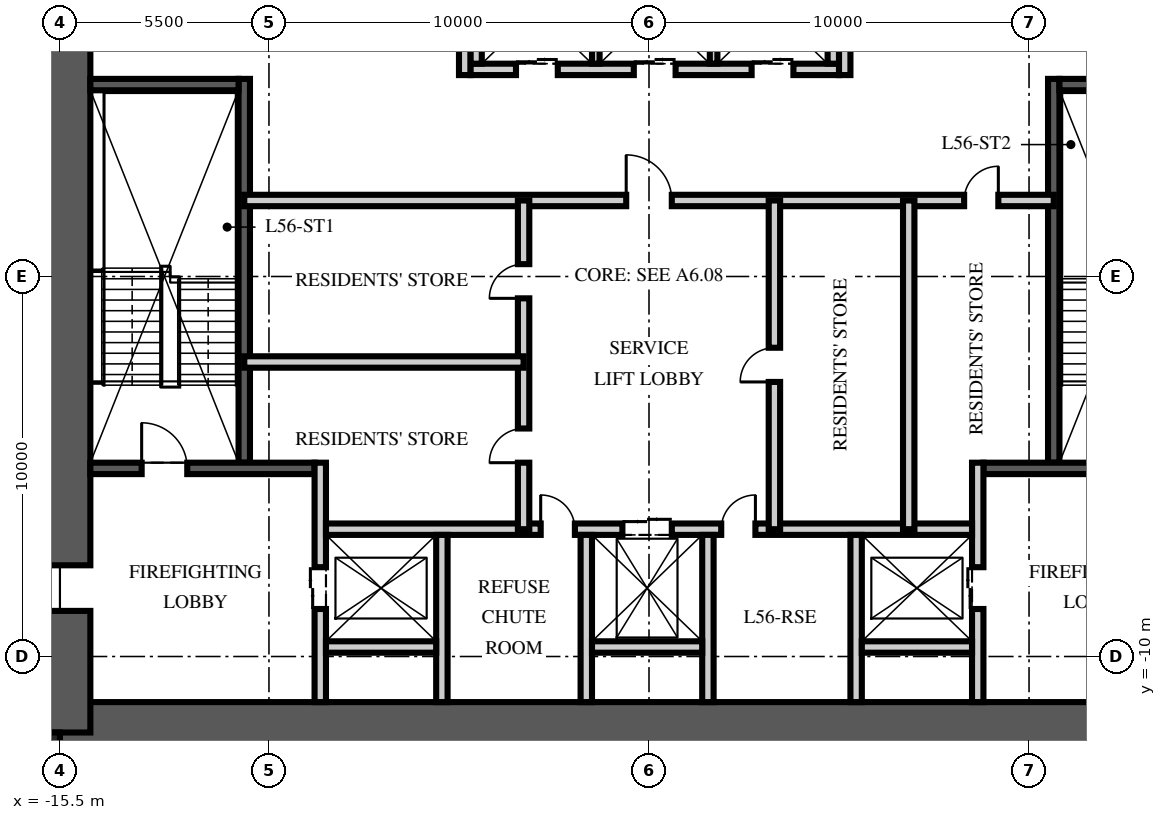
"""IFC4 building model, lengths in metres.
Left out: names, types, materials, properties, quantities, classifications, styles, units other than length and angle.
Written with IfcOpenShell. Run it as: python <this file> out.ifc"""

import sys

from ifc_helpers import new_model, si_unit, direction, frame, frame_2d, origin, origin_2d, place, context, subcontext, project, spatial, rectangle, extrude, element, fill, save


model = new_model("IFC4")
c1 = context("Model", 3, precision=1e-05, world=origin(), true_north=direction((0.0, 1.0)))
c2 = subcontext(c1, "Body", "Model", "MODEL_VIEW")
j1 = project(units=[si_unit("LENGTHUNIT", "METRE"), si_unit("PLANEANGLEUNIT", "RADIAN")], contexts=[c1])
p1 = place(None, origin())
s1 = spatial("IfcSite", under=j1, at=p1, CompositionType="ELEMENT")
p2 = place(p1, origin())
s2 = spatial("IfcBuilding", under=s1, at=p2, CompositionType="ELEMENT")
p3 = place(p2, frame((0.0, 0.0, 225.75)))
s3 = spatial("IfcBuildingStorey", under=s2, at=p3, CompositionType="ELEMENT", Elevation=225.75)
p4 = place(p3, frame((-15.5, -12.0, -0.25), z_axis=(0.0, 0.0, 1.0), x_axis=(1.0, 0.0, 0.0)))
e1 = element("IfcWall", 1, at=p4, inside=s3, PredefinedType="SHEAR", context=c2, shape_type="SweptSolid", body=[
    extrude(rectangle(XDim=31.0, YDim=1.6, at=frame_2d((15.5, 0.0))), origin(), (0.0, 0.0, 1.0), 3.75),
])
p5 = place(p3, frame((-15.5, -12.0, -0.25), z_axis=(0.0, 0.0, 1.0), x_axis=(0.0, 1.0, 0.0)))
e2 = element("IfcWall", 2, at=p5, inside=s3, PredefinedType="SHEAR", context=c2, shape_type="SweptSolid", body=[
    extrude(rectangle(XDim=24.0, YDim=1.6, at=frame_2d((12.0, 0.0))), origin(), (0.0, 0.0, 1.0), 3.75),
])
p6 = place(p5, frame((3.2, 0.0, 0.25)))
e3 = element("IfcOpeningElement", 3, at=p6, cuts=e2, PredefinedType="OPENING", context=c2, shape_type="SweptSolid", body=[
    extrude(rectangle(XDim=1.2, YDim=2.1, at=frame_2d((0.6, 1.05))), frame((0.0, 0.81, 0.0), z_axis=(0.0, -1.0, 0.0), x_axis=(1.0, 0.0, 0.0)), (0.0, 0.0, 1.0), 1.62),
])
p7 = place(p5, frame((19.3, 0.0, 0.25)))
e4 = element("IfcOpeningElement", 4, at=p7, cuts=e2, PredefinedType="OPENING", context=c2, shape_type="SweptSolid", body=[
    extrude(rectangle(XDim=1.8, YDim=2.1, at=frame_2d((0.9, 1.05))), frame((0.0, 0.81, 0.0), z_axis=(0.0, -1.0, 0.0), x_axis=(1.0, 0.0, 0.0)), (0.0, 0.0, 1.0), 1.62),
])
p8 = place(p3, frame((-15.9, -12.4, -0.25), z_axis=(0.0, 0.0, 1.0), x_axis=(1.0, 0.0, 0.0)))
e5 = element("IfcColumn", 5, at=p8, inside=s3, PredefinedType="COLUMN", context=c2, shape_type="SweptSolid", body=[
    extrude(rectangle(XDim=0.8, YDim=0.8, at=origin_2d()), origin(), (0.0, 0.0, 1.0), 3.75),
])
p9 = place(p3, frame((-10.65, -4.9, 0.0), z_axis=(0.0, 0.0, 1.0), x_axis=(0.0, 1.0, 0.0)))
e6 = element("IfcWall", 6, at=p9, inside=s3, PredefinedType="SOLIDWALL", context=c2, shape_type="SweptSolid", body=[
    extrude(rectangle(XDim=10.1, YDim=0.3, at=frame_2d((5.05, 0.0))), origin(), (0.0, 0.0, 1.0), 3.5),
])
p10 = place(p3, frame((-14.7, -5.05, 0.0), z_axis=(0.0, 0.0, 1.0), x_axis=(1.0, 0.0, 0.0)))
e7 = element("IfcWall", 7, at=p10, inside=s3, PredefinedType="SOLIDWALL", context=c2, shape_type="SweptSolid", body=[
    extrude(rectangle(XDim=5.9, YDim=0.3, at=frame_2d((2.95, 0.0))), origin(), (0.0, 0.0, 1.0), 3.5),
])
p11 = place(p10, frame((1.35, 0.0, 0.0)))
e8 = element("IfcOpeningElement", 8, at=p11, cuts=e7, PredefinedType="OPENING", context=c2, shape_type="SweptSolid", body=[
    extrude(rectangle(XDim=1.2, YDim=2.1, at=frame_2d((0.6, 1.05))), frame((0.0, 0.16, 0.0), z_axis=(0.0, -1.0, 0.0), x_axis=(1.0, 0.0, 0.0)), (0.0, 0.0, 1.0), 0.32),
])
p12 = place(p3, frame((-14.7, 5.05, 0.0), z_axis=(0.0, 0.0, 1.0), x_axis=(1.0, 0.0, 0.0)))
e9 = element("IfcWall", 9, at=p12, inside=s3, PredefinedType="SOLIDWALL", context=c2, shape_type="SweptSolid", body=[
    extrude(rectangle(XDim=3.9, YDim=0.3, at=frame_2d((1.95, 0.0))), origin(), (0.0, 0.0, 1.0), 3.5),
])
p13 = place(p3, frame((-8.65, -11.2, 0.0), z_axis=(0.0, 0.0, 1.0), x_axis=(0.0, 1.0, 0.0)))
e10 = element("IfcWall", 10, at=p13, inside=s3, PredefinedType="PARTITIONING", context=c2, shape_type="SweptSolid", body=[
    extrude(rectangle(XDim=6.3, YDim=0.3, at=frame_2d((3.15, 0.0))), origin(), (0.0, 0.0, 1.0), 3.5),
])
p14 = place(p13, frame((2.45, 0.0, 0.0)))
e11 = element("IfcOpeningElement", 11, at=p14, cuts=e10, PredefinedType="OPENING", context=c2, shape_type="SweptSolid", body=[
    extrude(rectangle(XDim=1.1, YDim=2.1, at=frame_2d((0.55, 1.05))), frame((0.0, 0.16, 0.0), z_axis=(0.0, -1.0, 0.0), x_axis=(1.0, 0.0, 0.0)), (0.0, 0.0, 1.0), 0.32),
])
p15 = place(p3, frame((10.65, -4.9, 0.0), z_axis=(0.0, 0.0, 1.0), x_axis=(0.0, 1.0, 0.0)))
e12 = element("IfcWall", 12, at=p15, inside=s3, PredefinedType="SOLIDWALL", context=c2, shape_type="SweptSolid", body=[
    extrude(rectangle(XDim=10.1, YDim=0.3, at=frame_2d((5.05, 0.0))), origin(), (0.0, 0.0, 1.0), 3.5),
])
p16 = place(p3, frame((14.7, -5.05, 0.0), z_axis=(0.0, 0.0, 1.0), x_axis=(-1.0, 0.0, 0.0)))
e13 = element("IfcWall", 13, at=p16, inside=s3, PredefinedType="SOLIDWALL", context=c2, shape_type="SweptSolid", body=[
    extrude(rectangle(XDim=5.9, YDim=0.3, at=frame_2d((2.95, 0.0))), origin(), (0.0, 0.0, 1.0), 3.5),
])
p17 = place(p16, frame((1.35, 0.0, 0.0)))
e14 = element("IfcOpeningElement", 14, at=p17, cuts=e13, PredefinedType="OPENING", context=c2, shape_type="SweptSolid", body=[
    extrude(rectangle(XDim=1.2, YDim=2.1, at=frame_2d((0.6, 1.05))), frame((0.0, 0.16, 0.0), z_axis=(0.0, -1.0, 0.0), x_axis=(1.0, 0.0, 0.0)), (0.0, 0.0, 1.0), 0.32),
])
p18 = place(p3, frame((14.7, 5.05, 0.0), z_axis=(0.0, 0.0, 1.0), x_axis=(-1.0, 0.0, 0.0)))
e15 = element("IfcWall", 15, at=p18, inside=s3, PredefinedType="SOLIDWALL", context=c2, shape_type="SweptSolid", body=[
    extrude(rectangle(XDim=3.9, YDim=0.3, at=frame_2d((1.95, 0.0))), origin(), (0.0, 0.0, 1.0), 3.5),
])
p19 = place(p3, frame((8.65, -11.2, 0.0), z_axis=(0.0, 0.0, 1.0), x_axis=(0.0, 1.0, 0.0)))
e16 = element("IfcWall", 16, at=p19, inside=s3, PredefinedType="PARTITIONING", context=c2, shape_type="SweptSolid", body=[
    extrude(rectangle(XDim=6.3, YDim=0.3, at=frame_2d((3.15, 0.0))), origin(), (0.0, 0.0, 1.0), 3.5),
])
p20 = place(p19, frame((2.45, 0.0, 0.0)))
e17 = element("IfcOpeningElement", 17, at=p20, cuts=e16, PredefinedType="OPENING", context=c2, shape_type="SweptSolid", body=[
    extrude(rectangle(XDim=1.1, YDim=2.1, at=frame_2d((0.55, 1.05))), frame((0.0, 0.16, 0.0), z_axis=(0.0, -1.0, 0.0), x_axis=(1.0, 0.0, 0.0)), (0.0, 0.0, 1.0), 0.32),
])
p21 = place(p3, frame((-8.5, -6.65, 0.0), z_axis=(0.0, 0.0, 1.0), x_axis=(1.0, 0.0, 0.0)))
e18 = element("IfcWall", 18, at=p21, inside=s3, PredefinedType="PARTITIONING", context=c2, shape_type="SweptSolid", body=[
    extrude(rectangle(XDim=17.0, YDim=0.3, at=frame_2d((8.5, 0.0))), origin(), (0.0, 0.0, 1.0), 3.5),
])
p22 = place(p21, frame((7.8, 0.0, 0.0)))
e19 = element("IfcOpeningElement", 19, at=p22, cuts=e18, PredefinedType="OPENING", context=c2, shape_type="SweptSolid", body=[
    extrude(rectangle(XDim=1.3, YDim=2.4, at=frame_2d((0.65, 1.2))), frame((0.0, 0.16, 0.0), z_axis=(0.0, -1.0, 0.0), x_axis=(1.0, 0.0, 0.0)), (0.0, 0.0, 1.0), 0.32),
])
p23 = place(p21, frame((5.65, 0.0, 0.0)))
e20 = element("IfcOpeningElement", 20, at=p23, cuts=e18, PredefinedType="OPENING", context=c2, shape_type="SweptSolid", body=[
    extrude(rectangle(XDim=0.9, YDim=2.1, at=frame_2d((0.45, 1.05))), frame((0.0, 0.16, 0.0), z_axis=(0.0, -1.0, 0.0), x_axis=(1.0, 0.0, 0.0)), (0.0, 0.0, 1.0), 0.32),
])
p24 = place(p21, frame((10.4, 0.0, 0.0)))
e21 = element("IfcOpeningElement", 21, at=p24, cuts=e18, PredefinedType="OPENING", context=c2, shape_type="SweptSolid", body=[
    extrude(rectangle(XDim=0.9, YDim=2.1, at=frame_2d((0.45, 1.05))), frame((0.0, 0.16, 0.0), z_axis=(0.0, -1.0, 0.0), x_axis=(1.0, 0.0, 0.0)), (0.0, 0.0, 1.0), 0.32),
])
for number, where, z_axis, x_axis in (
    (22, (-5.45, -11.2, 0.0), (0.0, 0.0, 1.0), (0.0, 1.0, 0.0)),
    (23, (-1.65, -11.2, 0.0), (0.0, 0.0, 1.0), (0.0, 1.0, 0.0)),
    (24, (1.55, -11.2, 0.0), (0.0, 0.0, 1.0), (0.0, 1.0, 0.0)),
    (25, (5.45, -11.2, 0.0), (0.0, 0.0, 1.0), (0.0, 1.0, 0.0)),
):
    element("IfcWall", number, at=place(p3, frame(where, z_axis=z_axis, x_axis=x_axis)), inside=s3, PredefinedType="PARTITIONING", context=c2, shape_type="SweptSolid", body=[
        extrude(rectangle(XDim=4.4, YDim=0.3, at=frame_2d((2.2, 0.0))), origin(), (0.0, 0.0, 1.0), 3.5),
    ])
for number, where, z_axis, x_axis in (
    (26, (-8.5, -9.75, 0.0), (0.0, 0.0, 1.0), (1.0, 0.0, 0.0)),
    (27, (-1.5, -9.75, 0.0), (0.0, 0.0, 1.0), (1.0, 0.0, 0.0)),
    (28, (5.6, -9.75, 0.0), (0.0, 0.0, 1.0), (1.0, 0.0, 0.0)),
):
    element("IfcWall", number, at=place(p3, frame(where, z_axis=z_axis, x_axis=x_axis)), inside=s3, PredefinedType="PARTITIONING", context=c2, shape_type="SweptSolid", body=[
        extrude(rectangle(XDim=2.9, YDim=0.3, at=frame_2d((1.45, 0.0))), origin(), (0.0, 0.0, 1.0), 3.5),
    ])
p25 = place(p3, frame((-4.7, 5.45, 0.0), z_axis=(0.0, 0.0, 1.0), x_axis=(1.0, 0.0, 0.0)))
e29 = element("IfcWall", 29, at=p25, inside=s3, PredefinedType="PARTITIONING", context=c2, shape_type="SweptSolid", body=[
    extrude(rectangle(XDim=9.7, YDim=0.3, at=frame_2d((4.85, 0.0))), origin(), (0.0, 0.0, 1.0), 3.5),
])
p26 = place(p25, frame((1.2, 0.0, 0.0)))
e30 = element("IfcOpeningElement", 30, at=p26, cuts=e29, PredefinedType="OPENING", context=c2, shape_type="SweptSolid", body=[
    extrude(rectangle(XDim=1.1, YDim=2.1, at=frame_2d((0.55, 1.05))), frame((0.0, 0.16, 0.0), z_axis=(0.0, -1.0, 0.0), x_axis=(1.0, 0.0, 0.0)), (0.0, 0.0, 1.0), 0.32),
])
p27 = place(p25, frame((4.3, 0.0, 0.0)))
e31 = element("IfcOpeningElement", 31, at=p27, cuts=e29, PredefinedType="OPENING", context=c2, shape_type="SweptSolid", body=[
    extrude(rectangle(XDim=1.1, YDim=2.1, at=frame_2d((0.55, 1.05))), frame((0.0, 0.16, 0.0), z_axis=(0.0, -1.0, 0.0), x_axis=(1.0, 0.0, 0.0)), (0.0, 0.0, 1.0), 0.32),
])
p28 = place(p25, frame((7.4, 0.0, 0.0)))
e32 = element("IfcOpeningElement", 32, at=p28, cuts=e29, PredefinedType="OPENING", context=c2, shape_type="SweptSolid", body=[
    extrude(rectangle(XDim=1.1, YDim=2.1, at=frame_2d((0.55, 1.05))), frame((0.0, 0.16, 0.0), z_axis=(0.0, -1.0, 0.0), x_axis=(1.0, 0.0, 0.0)), (0.0, 0.0, 1.0), 0.32),
])
for number, where, z_axis, x_axis in (
    (33, (-4.55, 5.6, 0.0), (0.0, 0.0, 1.0), (0.0, 1.0, 0.0)),
    (34, (4.85, 5.6, 0.0), (0.0, 0.0, 1.0), (0.0, 1.0, 0.0)),
):
    element("IfcWall", number, at=place(p3, frame(where, z_axis=z_axis, x_axis=x_axis)), inside=s3, PredefinedType="PARTITIONING", context=c2, shape_type="SweptSolid", body=[
        extrude(rectangle(XDim=2.8, YDim=0.3, at=frame_2d((1.4, 0.0))), origin(), (0.0, 0.0, 1.0), 3.5),
    ])
for number, where, z_axis, x_axis in (
    (35, (-1.4, 5.6, 0.0), (0.0, 0.0, 1.0), (0.0, 1.0, 0.0)),
    (36, (1.7, 5.6, 0.0), (0.0, 0.0, 1.0), (0.0, 1.0, 0.0)),
):
    element("IfcWall", number, at=place(p3, frame(where, z_axis=z_axis, x_axis=x_axis)), inside=s3, PredefinedType="PARTITIONING", context=c2, shape_type="SweptSolid", body=[
        extrude(rectangle(XDim=2.8, YDim=0.2, at=frame_2d((1.4, 0.0))), origin(), (0.0, 0.0, 1.0), 3.5),
    ])
p29 = place(p3, frame((-10.65, 2.0, 0.0), z_axis=(0.0, 0.0, 1.0), x_axis=(1.0, 0.0, 0.0)))
e37 = element("IfcWall", 37, at=p29, inside=s3, PredefinedType="PARTITIONING", context=c2, shape_type="SweptSolid", body=[
    extrude(rectangle(XDim=21.3, YDim=0.3, at=frame_2d((10.65, 0.0))), origin(), (0.0, 0.0, 1.0), 3.5),
])
p30 = place(p29, frame((10.05, 0.0, 0.0)))
e38 = element("IfcOpeningElement", 38, at=p30, cuts=e37, PredefinedType="OPENING", context=c2, shape_type="SweptSolid", body=[
    extrude(rectangle(XDim=1.2, YDim=2.1, at=frame_2d((0.6, 1.05))), frame((0.0, 0.16, 0.0), z_axis=(0.0, -1.0, 0.0), x_axis=(1.0, 0.0, 0.0)), (0.0, 0.0, 1.0), 0.32),
])
p31 = place(p29, frame((18.942, 0.0, 0.0)))
e39 = element("IfcOpeningElement", 39, at=p31, cuts=e37, PredefinedType="OPENING", context=c2, shape_type="SweptSolid", body=[
    extrude(rectangle(XDim=0.9, YDim=2.1, at=frame_2d((0.45, 1.05))), frame((0.0, 0.16, 0.0), z_axis=(0.0, -1.0, 0.0), x_axis=(1.0, 0.0, 0.0)), (0.0, 0.0, 1.0), 0.32),
])
p32 = place(p3, frame((-3.3, -6.65, 0.0), z_axis=(0.0, 0.0, 1.0), x_axis=(0.0, 1.0, 0.0)))
e40 = element("IfcWall", 40, at=p32, inside=s3, PredefinedType="PARTITIONING", context=c2, shape_type="SweptSolid", body=[
    extrude(rectangle(XDim=8.65, YDim=0.3, at=frame_2d((4.325, 0.0))), origin(), (0.0, 0.0, 1.0), 3.5),
])
p33 = place(p32, frame((1.75, 0.0, 0.0)))
e41 = element("IfcOpeningElement", 41, at=p33, cuts=e40, PredefinedType="OPENING", context=c2, shape_type="SweptSolid", body=[
    extrude(rectangle(XDim=0.9, YDim=2.1, at=frame_2d((0.45, 1.05))), frame((0.0, 0.16, 0.0), z_axis=(0.0, -1.0, 0.0), x_axis=(1.0, 0.0, 0.0)), (0.0, 0.0, 1.0), 0.32),
])
p34 = place(p32, frame((6.075, 0.0, 0.0)))
e42 = element("IfcOpeningElement", 42, at=p34, cuts=e40, PredefinedType="OPENING", context=c2, shape_type="SweptSolid", body=[
    extrude(rectangle(XDim=0.9, YDim=2.1, at=frame_2d((0.45, 1.05))), frame((0.0, 0.16, 0.0), z_axis=(0.0, -1.0, 0.0), x_axis=(1.0, 0.0, 0.0)), (0.0, 0.0, 1.0), 0.32),
])
p35 = place(p3, frame((3.3, -6.65, 0.0), z_axis=(0.0, 0.0, 1.0), x_axis=(0.0, 1.0, 0.0)))
e43 = element("IfcWall", 43, at=p35, inside=s3, PredefinedType="PARTITIONING", context=c2, shape_type="SweptSolid", body=[
    extrude(rectangle(XDim=8.65, YDim=0.3, at=frame_2d((4.325, 0.0))), origin(), (0.0, 0.0, 1.0), 3.5),
])
p36 = place(p35, frame((3.875, 0.0, 0.0)))
e44 = element("IfcOpeningElement", 44, at=p36, cuts=e43, PredefinedType="OPENING", context=c2, shape_type="SweptSolid", body=[
    extrude(rectangle(XDim=0.9, YDim=2.1, at=frame_2d((0.45, 1.05))), frame((0.0, 0.16, 0.0), z_axis=(0.0, -1.0, 0.0), x_axis=(1.0, 0.0, 0.0)), (0.0, 0.0, 1.0), 0.32),
])
p37 = place(p3, frame((-10.65, -2.25, 0.0), z_axis=(0.0, 0.0, 1.0), x_axis=(1.0, 0.0, 0.0)))
e45 = element("IfcWall", 45, at=p37, inside=s3, PredefinedType="PARTITIONING", context=c2, shape_type="SweptSolid", body=[
    extrude(rectangle(XDim=7.35, YDim=0.3, at=frame_2d((3.675, 0.0))), origin(), (0.0, 0.0, 1.0), 3.5),
])
p38 = place(p3, frame((6.834, -6.65, 0.0), z_axis=(0.0, 0.0, 1.0), x_axis=(0.0, 1.0, 0.0)))
e46 = element("IfcWall", 46, at=p38, inside=s3, PredefinedType="PARTITIONING", context=c2, shape_type="SweptSolid", body=[
    extrude(rectangle(XDim=8.65, YDim=0.3, at=frame_2d((4.325, 0.0))), origin(), (0.0, 0.0, 1.0), 3.5),
])
p39 = place(p3, frame((-4.85, 5.3, 0.0), z_axis=(0.0, 0.0, 1.0), x_axis=(0.0, 1.0, 0.0)))
e47 = element("IfcWall", 47, at=p39, inside=s3, PredefinedType="PARTITIONING", context=c2, shape_type="SweptSolid", body=[
    extrude(rectangle(XDim=5.9, YDim=0.3, at=frame_2d((2.95, 0.0))), origin(), (0.0, 0.0, 1.0), 3.5),
])
p40 = place(p39, frame((4.15, 0.0, 0.0)))
e48 = element("IfcOpeningElement", 48, at=p40, cuts=e47, PredefinedType="OPENING", context=c2, shape_type="SweptSolid", body=[
    extrude(rectangle(XDim=0.9, YDim=2.1, at=frame_2d((0.45, 1.05))), frame((0.0, 0.16, 0.0), z_axis=(0.0, -1.0, 0.0), x_axis=(1.0, 0.0, 0.0)), (0.0, 0.0, 1.0), 0.32),
])
p41 = place(p3, frame((5.15, 5.3, 0.0), z_axis=(0.0, 0.0, 1.0), x_axis=(0.0, 1.0, 0.0)))
e49 = element("IfcWall", 49, at=p41, inside=s3, PredefinedType="PARTITIONING", context=c2, shape_type="SweptSolid", body=[
    extrude(rectangle(XDim=5.9, YDim=0.3, at=frame_2d((2.95, 0.0))), origin(), (0.0, 0.0, 1.0), 3.5),
])
p42 = place(p41, frame((4.15, 0.0, 0.0)))
e50 = element("IfcOpeningElement", 50, at=p42, cuts=e49, PredefinedType="OPENING", context=c2, shape_type="SweptSolid", body=[
    extrude(rectangle(XDim=0.9, YDim=2.1, at=frame_2d((0.45, 1.05))), frame((0.0, 0.16, 0.0), z_axis=(0.0, -1.0, 0.0), x_axis=(1.0, 0.0, 0.0)), (0.0, 0.0, 1.0), 0.32),
])
p43 = place(p11, origin())
e51 = element("IfcDoor", 51, at=p43, inside=s3, OperationType="SINGLE_SWING_LEFT", PredefinedType="DOOR", context=c2, shape_type="SweptSolid", body=[
    extrude(rectangle(XDim=1.2, YDim=2.1, at=frame_2d((0.6, 1.05))), frame((0.0, 0.025, 0.0), z_axis=(0.0, -1.0, 0.0), x_axis=(1.0, 0.0, 0.0)), (0.0, 0.0, 1.0), 0.05),
])
fill(e8, e51)
p44 = place(p6, origin())
e52 = element("IfcDoor", 52, at=p44, inside=s3, OperationType="SINGLE_SWING_LEFT", PredefinedType="DOOR", context=c2, shape_type="SweptSolid", body=[
    extrude(rectangle(XDim=1.2, YDim=2.1, at=frame_2d((0.6, 1.05))), frame((0.0, 0.025, 0.0), z_axis=(0.0, -1.0, 0.0), x_axis=(1.0, 0.0, 0.0)), (0.0, 0.0, 1.0), 0.05),
])
fill(e3, e52)
p45 = place(p14, origin())
e53 = element("IfcDoor", 53, at=p45, inside=s3, OperationType="DOUBLE_DOOR_SLIDING", PredefinedType="DOOR", context=c2, shape_type="SweptSolid", body=[
    extrude(rectangle(XDim=1.1, YDim=2.1, at=frame_2d((0.55, 1.05))), frame((0.0, 0.025, 0.0), z_axis=(0.0, -1.0, 0.0), x_axis=(1.0, 0.0, 0.0)), (0.0, 0.0, 1.0), 0.05),
])
fill(e11, e53)
p46 = place(p20, origin())
e54 = element("IfcDoor", 54, at=p46, inside=s3, OperationType="DOUBLE_DOOR_SLIDING", PredefinedType="DOOR", context=c2, shape_type="SweptSolid", body=[
    extrude(rectangle(XDim=1.1, YDim=2.1, at=frame_2d((0.55, 1.05))), frame((0.0, 0.025, 0.0), z_axis=(0.0, -1.0, 0.0), x_axis=(1.0, 0.0, 0.0)), (0.0, 0.0, 1.0), 0.05),
])
fill(e17, e54)
p47 = place(p26, origin())
e55 = element("IfcDoor", 55, at=p47, inside=s3, OperationType="DOUBLE_DOOR_SLIDING", PredefinedType="DOOR", context=c2, shape_type="SweptSolid", body=[
    extrude(rectangle(XDim=1.1, YDim=2.1, at=frame_2d((0.55, 1.05))), frame((0.0, 0.025, 0.0), z_axis=(0.0, -1.0, 0.0), x_axis=(1.0, 0.0, 0.0)), (0.0, 0.0, 1.0), 0.05),
])
fill(e30, e55)
p48 = place(p27, origin())
e56 = element("IfcDoor", 56, at=p48, inside=s3, OperationType="DOUBLE_DOOR_SLIDING", PredefinedType="DOOR", context=c2, shape_type="SweptSolid", body=[
    extrude(rectangle(XDim=1.1, YDim=2.1, at=frame_2d((0.55, 1.05))), frame((0.0, 0.025, 0.0), z_axis=(0.0, -1.0, 0.0), x_axis=(1.0, 0.0, 0.0)), (0.0, 0.0, 1.0), 0.05),
])
fill(e31, e56)
p49 = place(p28, origin())
e57 = element("IfcDoor", 57, at=p49, inside=s3, OperationType="DOUBLE_DOOR_SLIDING", PredefinedType="DOOR", context=c2, shape_type="SweptSolid", body=[
    extrude(rectangle(XDim=1.1, YDim=2.1, at=frame_2d((0.55, 1.05))), frame((0.0, 0.025, 0.0), z_axis=(0.0, -1.0, 0.0), x_axis=(1.0, 0.0, 0.0)), (0.0, 0.0, 1.0), 0.05),
])
fill(e32, e57)
p50 = place(p22, origin())
e58 = element("IfcDoor", 58, at=p50, inside=s3, OperationType="DOUBLE_DOOR_SLIDING", PredefinedType="DOOR", context=c2, shape_type="SweptSolid", body=[
    extrude(rectangle(XDim=1.3, YDim=2.4, at=frame_2d((0.65, 1.2))), frame((0.0, 0.025, 0.0), z_axis=(0.0, -1.0, 0.0), x_axis=(1.0, 0.0, 0.0)), (0.0, 0.0, 1.0), 0.05),
])
fill(e19, e58)
p51 = place(p30, origin())
e59 = element("IfcDoor", 59, at=p51, inside=s3, OperationType="SINGLE_SWING_LEFT", PredefinedType="DOOR", context=c2, shape_type="SweptSolid", body=[
    extrude(rectangle(XDim=1.2, YDim=2.1, at=frame_2d((0.6, 1.05))), frame((0.0, 0.025, 0.0), z_axis=(0.0, -1.0, 0.0), x_axis=(1.0, 0.0, 0.0)), (0.0, 0.0, 1.0), 0.05),
])
fill(e38, e59)
p52 = place(p23, origin())
e60 = element("IfcDoor", 60, at=p52, inside=s3, OperationType="SINGLE_SWING_LEFT", PredefinedType="DOOR", context=c2, shape_type="SweptSolid", body=[
    extrude(rectangle(XDim=0.9, YDim=2.1, at=frame_2d((0.45, 1.05))), frame((0.0, 0.025, 0.0), z_axis=(0.0, -1.0, 0.0), x_axis=(1.0, 0.0, 0.0)), (0.0, 0.0, 1.0), 0.05),
])
fill(e20, e60)
p53 = place(p24, origin())
e61 = element("IfcDoor", 61, at=p53, inside=s3, OperationType="SINGLE_SWING_RIGHT", PredefinedType="DOOR", context=c2, shape_type="SweptSolid", body=[
    extrude(rectangle(XDim=0.9, YDim=2.1, at=frame_2d((0.45, 1.05))), frame((0.0, 0.025, 0.0), z_axis=(0.0, -1.0, 0.0), x_axis=(1.0, 0.0, 0.0)), (0.0, 0.0, 1.0), 0.05),
])
fill(e21, e61)
p54 = place(p33, origin())
e62 = element("IfcDoor", 62, at=p54, inside=s3, OperationType="SINGLE_SWING_LEFT", PredefinedType="DOOR", context=c2, shape_type="SweptSolid", body=[
    extrude(rectangle(XDim=0.9, YDim=2.1, at=frame_2d((0.45, 1.05))), frame((0.0, 0.025, 0.0), z_axis=(0.0, -1.0, 0.0), x_axis=(1.0, 0.0, 0.0)), (0.0, 0.0, 1.0), 0.05),
])
fill(e41, e62)
p55 = place(p34, origin())
e63 = element("IfcDoor", 63, at=p55, inside=s3, OperationType="SINGLE_SWING_LEFT", PredefinedType="DOOR", context=c2, shape_type="SweptSolid", body=[
    extrude(rectangle(XDim=0.9, YDim=2.1, at=frame_2d((0.45, 1.05))), frame((0.0, 0.025, 0.0), z_axis=(0.0, -1.0, 0.0), x_axis=(1.0, 0.0, 0.0)), (0.0, 0.0, 1.0), 0.05),
])
fill(e42, e63)
p56 = place(p36, origin())
e64 = element("IfcDoor", 64, at=p56, inside=s3, OperationType="SINGLE_SWING_LEFT", PredefinedType="DOOR", context=c2, shape_type="SweptSolid", body=[
    extrude(rectangle(XDim=0.9, YDim=2.1, at=frame_2d((0.45, 1.05))), frame((0.0, 0.025, 0.0), z_axis=(0.0, -1.0, 0.0), x_axis=(1.0, 0.0, 0.0)), (0.0, 0.0, 1.0), 0.05),
])
fill(e44, e64)
p57 = place(p31, origin())
e65 = element("IfcDoor", 65, at=p57, inside=s3, OperationType="SINGLE_SWING_RIGHT", PredefinedType="DOOR", context=c2, shape_type="SweptSolid", body=[
    extrude(rectangle(XDim=0.9, YDim=2.1, at=frame_2d((0.45, 1.05))), frame((0.0, 0.025, 0.0), z_axis=(0.0, -1.0, 0.0), x_axis=(1.0, 0.0, 0.0)), (0.0, 0.0, 1.0), 0.05),
])
fill(e39, e65)
save(model, sys.argv[1])
